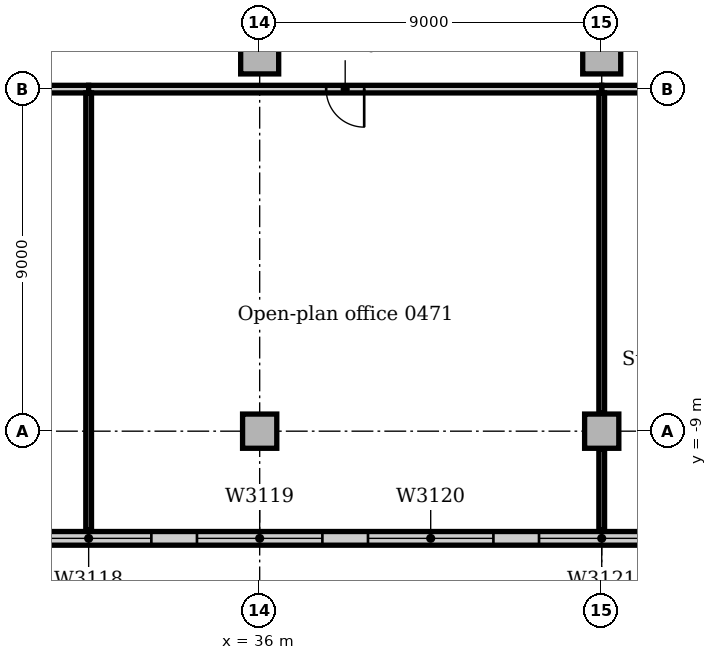
"""IFC4 building model, lengths in metres.
Left out: names, types, materials, properties, quantities, classifications, styles, units other than length and angle.
Written with IfcOpenShell. Run it as: python <this file> out.ifc"""

import sys

from ifc_helpers import new_model, si_unit, direction, frame, frame_2d, origin, origin_2d, place, context, subcontext, project, spatial, rectangle, extrude, element, fill, save


model = new_model("IFC4")
c1 = context("Model", 3, precision=1e-05, world=origin(), true_north=direction((0.0, 1.0)))
c2 = subcontext(c1, "Body", "Model", "MODEL_VIEW")
j1 = project(units=[si_unit("LENGTHUNIT", "METRE"), si_unit("PLANEANGLEUNIT", "RADIAN")], contexts=[c1])
p1 = place(None, origin())
s1 = spatial("IfcSite", under=j1, at=p1, CompositionType="ELEMENT")
p2 = place(p1, origin())
s2 = spatial("IfcBuilding", under=s1, at=p2, CompositionType="ELEMENT")
p3 = place(p2, frame((0.0, 0.0, 21.0)))
s3 = spatial("IfcBuildingStorey", under=s2, at=p3, CompositionType="ELEMENT", Elevation=21.0)
for number, where, z_axis, x_axis in (
    (1, (36.0, 0.9, 0.0), (0.0, 0.0, 1.0), (1.0, 0.0, 0.0)),
    (2, (45.0, 0.9, 0.0), (0.0, 0.0, 1.0), (1.0, 0.0, 0.0)),
):
    element("IfcColumn", number, at=place(p3, frame(where, z_axis=z_axis, x_axis=x_axis)), inside=s3, PredefinedType="COLUMN", context=c2, shape_type="SweptSolid", body=[
        extrude(rectangle(XDim=1.0, YDim=1.0, at=origin_2d()), origin(), (0.0, 0.0, 1.0), 4.85),
    ])
for number, where, z_axis, x_axis in (
    (3, (36.0, -9.0, 0.0), (0.0, 0.0, 1.0), (1.0, 0.0, 0.0)),
    (4, (45.0, -9.0, 0.0), (0.0, 0.0, 1.0), (1.0, 0.0, 0.0)),
):
    element("IfcColumn", number, at=place(p3, frame(where, z_axis=z_axis, x_axis=x_axis)), inside=s3, PredefinedType="COLUMN", context=c2, shape_type="SweptSolid", body=[
        extrude(rectangle(XDim=0.9, YDim=0.9, at=origin_2d()), origin(), (0.0, 0.0, 1.0), 4.7),
    ])
p4 = place(p3, frame((-81.0, -11.82, 0.0), z_axis=(0.0, 0.0, 1.0), x_axis=(1.0, 0.0, 0.0)))
e5 = element("IfcWall", 5, at=p4, inside=s3, PredefinedType="STANDARD", context=c2, shape_type="SweptSolid", body=[
    extrude(rectangle(XDim=144.0, YDim=0.36, at=frame_2d((72.0, 0.0))), origin(), (0.0, 0.0, 1.0), 4.85),
])
p5 = place(p4, frame((2.85, 0.0, 0.9)))
e6 = element("IfcOpeningElement", 6, at=p5, cuts=e5, PredefinedType="OPENING", context=c2, shape_type="SweptSolid", body=[
    extrude(rectangle(XDim=3.3, YDim=2.4, at=frame_2d((1.65, 1.2))), frame((0.0, 0.19, 0.0), z_axis=(0.0, -1.0, 0.0), x_axis=(1.0, 0.0, 0.0)), (0.0, 0.0, 1.0), 0.38),
])
p6 = place(p4, frame((7.35, 0.0, 0.9)))
e7 = element("IfcOpeningElement", 7, at=p6, cuts=e5, PredefinedType="OPENING", context=c2, shape_type="SweptSolid", body=[
    extrude(rectangle(XDim=3.3, YDim=2.4, at=frame_2d((1.65, 1.2))), frame((0.0, 0.19, 0.0), z_axis=(0.0, -1.0, 0.0), x_axis=(1.0, 0.0, 0.0)), (0.0, 0.0, 1.0), 0.38),
])
p7 = place(p4, frame((11.85, 0.0, 0.9)))
e8 = element("IfcOpeningElement", 8, at=p7, cuts=e5, PredefinedType="OPENING", context=c2, shape_type="SweptSolid", body=[
    extrude(rectangle(XDim=3.3, YDim=2.4, at=frame_2d((1.65, 1.2))), frame((0.0, 0.19, 0.0), z_axis=(0.0, -1.0, 0.0), x_axis=(1.0, 0.0, 0.0)), (0.0, 0.0, 1.0), 0.38),
])
p8 = place(p4, frame((16.35, 0.0, 0.9)))
e9 = element("IfcOpeningElement", 9, at=p8, cuts=e5, PredefinedType="OPENING", context=c2, shape_type="SweptSolid", body=[
    extrude(rectangle(XDim=3.3, YDim=2.4, at=frame_2d((1.65, 1.2))), frame((0.0, 0.19, 0.0), z_axis=(0.0, -1.0, 0.0), x_axis=(1.0, 0.0, 0.0)), (0.0, 0.0, 1.0), 0.38),
])
p9 = place(p4, frame((20.85, 0.0, 0.9)))
e10 = element("IfcOpeningElement", 10, at=p9, cuts=e5, PredefinedType="OPENING", context=c2, shape_type="SweptSolid", body=[
    extrude(rectangle(XDim=3.3, YDim=2.4, at=frame_2d((1.65, 1.2))), frame((0.0, 0.19, 0.0), z_axis=(0.0, -1.0, 0.0), x_axis=(1.0, 0.0, 0.0)), (0.0, 0.0, 1.0), 0.38),
])
p10 = place(p4, frame((25.35, 0.0, 0.9)))
e11 = element("IfcOpeningElement", 11, at=p10, cuts=e5, PredefinedType="OPENING", context=c2, shape_type="SweptSolid", body=[
    extrude(rectangle(XDim=3.3, YDim=2.4, at=frame_2d((1.65, 1.2))), frame((0.0, 0.19, 0.0), z_axis=(0.0, -1.0, 0.0), x_axis=(1.0, 0.0, 0.0)), (0.0, 0.0, 1.0), 0.38),
])
p11 = place(p4, frame((29.85, 0.0, 0.9)))
e12 = element("IfcOpeningElement", 12, at=p11, cuts=e5, PredefinedType="OPENING", context=c2, shape_type="SweptSolid", body=[
    extrude(rectangle(XDim=3.3, YDim=2.4, at=frame_2d((1.65, 1.2))), frame((0.0, 0.19, 0.0), z_axis=(0.0, -1.0, 0.0), x_axis=(1.0, 0.0, 0.0)), (0.0, 0.0, 1.0), 0.38),
])
p12 = place(p4, frame((34.35, 0.0, 0.9)))
e13 = element("IfcOpeningElement", 13, at=p12, cuts=e5, PredefinedType="OPENING", context=c2, shape_type="SweptSolid", body=[
    extrude(rectangle(XDim=3.3, YDim=2.4, at=frame_2d((1.65, 1.2))), frame((0.0, 0.19, 0.0), z_axis=(0.0, -1.0, 0.0), x_axis=(1.0, 0.0, 0.0)), (0.0, 0.0, 1.0), 0.38),
])
p13 = place(p4, frame((38.85, 0.0, 0.9)))
e14 = element("IfcOpeningElement", 14, at=p13, cuts=e5, PredefinedType="OPENING", context=c2, shape_type="SweptSolid", body=[
    extrude(rectangle(XDim=3.3, YDim=2.4, at=frame_2d((1.65, 1.2))), frame((0.0, 0.19, 0.0), z_axis=(0.0, -1.0, 0.0), x_axis=(1.0, 0.0, 0.0)), (0.0, 0.0, 1.0), 0.38),
])
p14 = place(p4, frame((43.35, 0.0, 0.9)))
e15 = element("IfcOpeningElement", 15, at=p14, cuts=e5, PredefinedType="OPENING", context=c2, shape_type="SweptSolid", body=[
    extrude(rectangle(XDim=3.3, YDim=2.4, at=frame_2d((1.65, 1.2))), frame((0.0, 0.19, 0.0), z_axis=(0.0, -1.0, 0.0), x_axis=(1.0, 0.0, 0.0)), (0.0, 0.0, 1.0), 0.38),
])
p15 = place(p4, frame((47.85, 0.0, 0.9)))
e16 = element("IfcOpeningElement", 16, at=p15, cuts=e5, PredefinedType="OPENING", context=c2, shape_type="SweptSolid", body=[
    extrude(rectangle(XDim=3.3, YDim=2.4, at=frame_2d((1.65, 1.2))), frame((0.0, 0.19, 0.0), z_axis=(0.0, -1.0, 0.0), x_axis=(1.0, 0.0, 0.0)), (0.0, 0.0, 1.0), 0.38),
])
p16 = place(p4, frame((52.35, 0.0, 0.9)))
e17 = element("IfcOpeningElement", 17, at=p16, cuts=e5, PredefinedType="OPENING", context=c2, shape_type="SweptSolid", body=[
    extrude(rectangle(XDim=3.3, YDim=2.4, at=frame_2d((1.65, 1.2))), frame((0.0, 0.19, 0.0), z_axis=(0.0, -1.0, 0.0), x_axis=(1.0, 0.0, 0.0)), (0.0, 0.0, 1.0), 0.38),
])
p17 = place(p4, frame((56.85, 0.0, 0.9)))
e18 = element("IfcOpeningElement", 18, at=p17, cuts=e5, PredefinedType="OPENING", context=c2, shape_type="SweptSolid", body=[
    extrude(rectangle(XDim=3.3, YDim=2.4, at=frame_2d((1.65, 1.2))), frame((0.0, 0.19, 0.0), z_axis=(0.0, -1.0, 0.0), x_axis=(1.0, 0.0, 0.0)), (0.0, 0.0, 1.0), 0.38),
])
p18 = place(p4, frame((61.35, 0.0, 0.9)))
e19 = element("IfcOpeningElement", 19, at=p18, cuts=e5, PredefinedType="OPENING", context=c2, shape_type="SweptSolid", body=[
    extrude(rectangle(XDim=3.3, YDim=2.4, at=frame_2d((1.65, 1.2))), frame((0.0, 0.19, 0.0), z_axis=(0.0, -1.0, 0.0), x_axis=(1.0, 0.0, 0.0)), (0.0, 0.0, 1.0), 0.38),
])
p19 = place(p4, frame((65.85, 0.0, 0.9)))
e20 = element("IfcOpeningElement", 20, at=p19, cuts=e5, PredefinedType="OPENING", context=c2, shape_type="SweptSolid", body=[
    extrude(rectangle(XDim=3.3, YDim=2.4, at=frame_2d((1.65, 1.2))), frame((0.0, 0.19, 0.0), z_axis=(0.0, -1.0, 0.0), x_axis=(1.0, 0.0, 0.0)), (0.0, 0.0, 1.0), 0.38),
])
p20 = place(p4, frame((70.35, 0.0, 0.9)))
e21 = element("IfcOpeningElement", 21, at=p20, cuts=e5, PredefinedType="OPENING", context=c2, shape_type="SweptSolid", body=[
    extrude(rectangle(XDim=3.3, YDim=2.4, at=frame_2d((1.65, 1.2))), frame((0.0, 0.19, 0.0), z_axis=(0.0, -1.0, 0.0), x_axis=(1.0, 0.0, 0.0)), (0.0, 0.0, 1.0), 0.38),
])
p21 = place(p4, frame((74.85, 0.0, 0.9)))
e22 = element("IfcOpeningElement", 22, at=p21, cuts=e5, PredefinedType="OPENING", context=c2, shape_type="SweptSolid", body=[
    extrude(rectangle(XDim=3.3, YDim=2.4, at=frame_2d((1.65, 1.2))), frame((0.0, 0.19, 0.0), z_axis=(0.0, -1.0, 0.0), x_axis=(1.0, 0.0, 0.0)), (0.0, 0.0, 1.0), 0.38),
])
p22 = place(p4, frame((79.35, 0.0, 0.9)))
e23 = element("IfcOpeningElement", 23, at=p22, cuts=e5, PredefinedType="OPENING", context=c2, shape_type="SweptSolid", body=[
    extrude(rectangle(XDim=3.3, YDim=2.4, at=frame_2d((1.65, 1.2))), frame((0.0, 0.19, 0.0), z_axis=(0.0, -1.0, 0.0), x_axis=(1.0, 0.0, 0.0)), (0.0, 0.0, 1.0), 0.38),
])
p23 = place(p4, frame((83.85, 0.0, 0.9)))
e24 = element("IfcOpeningElement", 24, at=p23, cuts=e5, PredefinedType="OPENING", context=c2, shape_type="SweptSolid", body=[
    extrude(rectangle(XDim=3.3, YDim=2.4, at=frame_2d((1.65, 1.2))), frame((0.0, 0.19, 0.0), z_axis=(0.0, -1.0, 0.0), x_axis=(1.0, 0.0, 0.0)), (0.0, 0.0, 1.0), 0.38),
])
p24 = place(p4, frame((88.35, 0.0, 0.9)))
e25 = element("IfcOpeningElement", 25, at=p24, cuts=e5, PredefinedType="OPENING", context=c2, shape_type="SweptSolid", body=[
    extrude(rectangle(XDim=3.3, YDim=2.4, at=frame_2d((1.65, 1.2))), frame((0.0, 0.19, 0.0), z_axis=(0.0, -1.0, 0.0), x_axis=(1.0, 0.0, 0.0)), (0.0, 0.0, 1.0), 0.38),
])
p25 = place(p4, frame((92.85, 0.0, 0.9)))
e26 = element("IfcOpeningElement", 26, at=p25, cuts=e5, PredefinedType="OPENING", context=c2, shape_type="SweptSolid", body=[
    extrude(rectangle(XDim=3.3, YDim=2.4, at=frame_2d((1.65, 1.2))), frame((0.0, 0.19, 0.0), z_axis=(0.0, -1.0, 0.0), x_axis=(1.0, 0.0, 0.0)), (0.0, 0.0, 1.0), 0.38),
])
p26 = place(p4, frame((97.35, 0.0, 0.9)))
e27 = element("IfcOpeningElement", 27, at=p26, cuts=e5, PredefinedType="OPENING", context=c2, shape_type="SweptSolid", body=[
    extrude(rectangle(XDim=3.3, YDim=2.4, at=frame_2d((1.65, 1.2))), frame((0.0, 0.19, 0.0), z_axis=(0.0, -1.0, 0.0), x_axis=(1.0, 0.0, 0.0)), (0.0, 0.0, 1.0), 0.38),
])
p27 = place(p4, frame((101.85, 0.0, 0.9)))
e28 = element("IfcOpeningElement", 28, at=p27, cuts=e5, PredefinedType="OPENING", context=c2, shape_type="SweptSolid", body=[
    extrude(rectangle(XDim=3.3, YDim=2.4, at=frame_2d((1.65, 1.2))), frame((0.0, 0.19, 0.0), z_axis=(0.0, -1.0, 0.0), x_axis=(1.0, 0.0, 0.0)), (0.0, 0.0, 1.0), 0.38),
])
p28 = place(p4, frame((106.35, 0.0, 0.9)))
e29 = element("IfcOpeningElement", 29, at=p28, cuts=e5, PredefinedType="OPENING", context=c2, shape_type="SweptSolid", body=[
    extrude(rectangle(XDim=3.3, YDim=2.4, at=frame_2d((1.65, 1.2))), frame((0.0, 0.19, 0.0), z_axis=(0.0, -1.0, 0.0), x_axis=(1.0, 0.0, 0.0)), (0.0, 0.0, 1.0), 0.38),
])
p29 = place(p4, frame((110.85, 0.0, 0.9)))
e30 = element("IfcOpeningElement", 30, at=p29, cuts=e5, PredefinedType="OPENING", context=c2, shape_type="SweptSolid", body=[
    extrude(rectangle(XDim=3.3, YDim=2.4, at=frame_2d((1.65, 1.2))), frame((0.0, 0.19, 0.0), z_axis=(0.0, -1.0, 0.0), x_axis=(1.0, 0.0, 0.0)), (0.0, 0.0, 1.0), 0.38),
])
p30 = place(p4, frame((115.35, 0.0, 0.9)))
e31 = element("IfcOpeningElement", 31, at=p30, cuts=e5, PredefinedType="OPENING", context=c2, shape_type="SweptSolid", body=[
    extrude(rectangle(XDim=3.3, YDim=2.4, at=frame_2d((1.65, 1.2))), frame((0.0, 0.19, 0.0), z_axis=(0.0, -1.0, 0.0), x_axis=(1.0, 0.0, 0.0)), (0.0, 0.0, 1.0), 0.38),
])
p31 = place(p4, frame((119.85, 0.0, 0.9)))
e32 = element("IfcOpeningElement", 32, at=p31, cuts=e5, PredefinedType="OPENING", context=c2, shape_type="SweptSolid", body=[
    extrude(rectangle(XDim=3.3, YDim=2.4, at=frame_2d((1.65, 1.2))), frame((0.0, 0.19, 0.0), z_axis=(0.0, -1.0, 0.0), x_axis=(1.0, 0.0, 0.0)), (0.0, 0.0, 1.0), 0.38),
])
p32 = place(p4, frame((124.35, 0.0, 0.9)))
e33 = element("IfcOpeningElement", 33, at=p32, cuts=e5, PredefinedType="OPENING", context=c2, shape_type="SweptSolid", body=[
    extrude(rectangle(XDim=3.3, YDim=2.4, at=frame_2d((1.65, 1.2))), frame((0.0, 0.19, 0.0), z_axis=(0.0, -1.0, 0.0), x_axis=(1.0, 0.0, 0.0)), (0.0, 0.0, 1.0), 0.38),
])
p33 = place(p4, frame((128.85, 0.0, 0.9)))
e34 = element("IfcOpeningElement", 34, at=p33, cuts=e5, PredefinedType="OPENING", context=c2, shape_type="SweptSolid", body=[
    extrude(rectangle(XDim=3.3, YDim=2.4, at=frame_2d((1.65, 1.2))), frame((0.0, 0.19, 0.0), z_axis=(0.0, -1.0, 0.0), x_axis=(1.0, 0.0, 0.0)), (0.0, 0.0, 1.0), 0.38),
])
p34 = place(p4, frame((133.35, 0.0, 0.9)))
e35 = element("IfcOpeningElement", 35, at=p34, cuts=e5, PredefinedType="OPENING", context=c2, shape_type="SweptSolid", body=[
    extrude(rectangle(XDim=3.3, YDim=2.4, at=frame_2d((1.65, 1.2))), frame((0.0, 0.19, 0.0), z_axis=(0.0, -1.0, 0.0), x_axis=(1.0, 0.0, 0.0)), (0.0, 0.0, 1.0), 0.38),
])
p35 = place(p4, frame((137.85, 0.0, 0.9)))
e36 = element("IfcOpeningElement", 36, at=p35, cuts=e5, PredefinedType="OPENING", context=c2, shape_type="SweptSolid", body=[
    extrude(rectangle(XDim=3.3, YDim=2.4, at=frame_2d((1.65, 1.2))), frame((0.0, 0.19, 0.0), z_axis=(0.0, -1.0, 0.0), x_axis=(1.0, 0.0, 0.0)), (0.0, 0.0, 1.0), 0.38),
])
p36 = place(p3, frame((45.0, 0.0, 0.0), z_axis=(0.0, 0.0, 1.0), x_axis=(1.0, 0.0, 0.0)))
e37 = element("IfcWall", 37, at=p36, inside=s3, PredefinedType="PARTITIONING", context=c2, shape_type="SweptSolid", body=[
    extrude(rectangle(XDim=9.0, YDim=0.2, at=frame_2d((4.5, 0.0))), origin(), (0.0, 0.0, 1.0), 4.7),
])
p37 = place(p36, frame((4.6, 0.0, 0.0)))
e38 = element("IfcOpeningElement", 38, at=p37, cuts=e37, PredefinedType="OPENING", context=c2, shape_type="SweptSolid", body=[
    extrude(rectangle(XDim=1.0, YDim=2.1, at=frame_2d((0.5, 1.05))), frame((0.0, 0.11, 0.0), z_axis=(0.0, -1.0, 0.0), x_axis=(1.0, 0.0, 0.0)), (0.0, 0.0, 1.0), 0.22),
])
p38 = place(p3, frame((18.0, 0.0, 0.0), z_axis=(0.0, 0.0, 1.0), x_axis=(1.0, 0.0, 0.0)))
e39 = element("IfcWall", 39, at=p38, inside=s3, PredefinedType="PARTITIONING", context=c2, shape_type="SweptSolid", body=[
    extrude(rectangle(XDim=13.5, YDim=0.2, at=frame_2d((6.75, 0.0))), origin(), (0.0, 0.0, 1.0), 4.85),
])
p39 = place(p38, frame((6.25, 0.0, 0.0)))
e40 = element("IfcOpeningElement", 40, at=p39, cuts=e39, PredefinedType="OPENING", context=c2, shape_type="SweptSolid", body=[
    extrude(rectangle(XDim=1.0, YDim=2.1, at=frame_2d((0.5, 1.05))), frame((0.0, 0.11, 0.0), z_axis=(0.0, -1.0, 0.0), x_axis=(1.0, 0.0, 0.0)), (0.0, 0.0, 1.0), 0.22),
])
p40 = place(p3, frame((31.5, 0.0, 0.0), z_axis=(0.0, 0.0, 1.0), x_axis=(1.0, 0.0, 0.0)))
e41 = element("IfcWall", 41, at=p40, inside=s3, PredefinedType="PARTITIONING", context=c2, shape_type="SweptSolid", body=[
    extrude(rectangle(XDim=13.5, YDim=0.2, at=frame_2d((6.75, 0.0))), origin(), (0.0, 0.0, 1.0), 4.85),
])
p41 = place(p40, frame((6.25, 0.0, 0.0)))
e42 = element("IfcOpeningElement", 42, at=p41, cuts=e41, PredefinedType="OPENING", context=c2, shape_type="SweptSolid", body=[
    extrude(rectangle(XDim=1.0, YDim=2.1, at=frame_2d((0.5, 1.05))), frame((0.0, 0.11, 0.0), z_axis=(0.0, -1.0, 0.0), x_axis=(1.0, 0.0, 0.0)), (0.0, 0.0, 1.0), 0.22),
])
p42 = place(p3, frame((45.0, -11.6, 0.0), z_axis=(0.0, 0.0, 1.0), x_axis=(0.0, 1.0, 0.0)))
e43 = element("IfcWall", 43, at=p42, inside=s3, PredefinedType="PARTITIONING", context=c2, shape_type="SweptSolid", body=[
    extrude(rectangle(XDim=2.13, YDim=0.15, at=frame_2d((1.065, 0.0))), origin(), (0.0, 0.0, 1.0), 4.7),
])
p43 = place(p3, frame((45.0, -8.53, 0.0), z_axis=(0.0, 0.0, 1.0), x_axis=(0.0, 1.0, 0.0)))
e44 = element("IfcWall", 44, at=p43, inside=s3, PredefinedType="PARTITIONING", context=c2, shape_type="SweptSolid", body=[
    extrude(rectangle(XDim=8.43, YDim=0.15, at=frame_2d((4.215, 0.0))), origin(), (0.0, 0.0, 1.0), 4.7),
])
p44 = place(p3, frame((31.5, -11.6, 0.0), z_axis=(0.0, 0.0, 1.0), x_axis=(0.0, 1.0, 0.0)))
e45 = element("IfcWall", 45, at=p44, inside=s3, PredefinedType="PARTITIONING", context=c2, shape_type="SweptSolid", body=[
    extrude(rectangle(XDim=11.5, YDim=0.15, at=frame_2d((5.75, 0.0))), origin(), (0.0, 0.0, 1.0), 4.7),
])
p45 = place(p29, origin())
e46 = element("IfcWindow", 46, at=p45, inside=s3, PartitioningType="SINGLE_PANEL", PredefinedType="WINDOW", context=c2, shape_type="SweptSolid", body=[
    extrude(rectangle(XDim=3.3, YDim=2.4, at=frame_2d((1.65, 1.2))), frame((0.0, 0.13, 0.0), z_axis=(0.0, -1.0, 0.0), x_axis=(1.0, 0.0, 0.0)), (0.0, 0.0, 1.0), 0.06),
])
fill(e30, e46)
p46 = place(p30, origin())
e47 = element("IfcWindow", 47, at=p46, inside=s3, PartitioningType="SINGLE_PANEL", PredefinedType="WINDOW", context=c2, shape_type="SweptSolid", body=[
    extrude(rectangle(XDim=3.3, YDim=2.4, at=frame_2d((1.65, 1.2))), frame((0.0, 0.13, 0.0), z_axis=(0.0, -1.0, 0.0), x_axis=(1.0, 0.0, 0.0)), (0.0, 0.0, 1.0), 0.06),
])
fill(e31, e47)
p47 = place(p31, origin())
e48 = element("IfcWindow", 48, at=p47, inside=s3, PartitioningType="SINGLE_PANEL", PredefinedType="WINDOW", context=c2, shape_type="SweptSolid", body=[
    extrude(rectangle(XDim=3.3, YDim=2.4, at=frame_2d((1.65, 1.2))), frame((0.0, 0.13, 0.0), z_axis=(0.0, -1.0, 0.0), x_axis=(1.0, 0.0, 0.0)), (0.0, 0.0, 1.0), 0.06),
])
fill(e32, e48)
p48 = place(p32, origin())
e49 = element("IfcWindow", 49, at=p48, inside=s3, PartitioningType="SINGLE_PANEL", PredefinedType="WINDOW", context=c2, shape_type="SweptSolid", body=[
    extrude(rectangle(XDim=3.3, YDim=2.4, at=frame_2d((1.65, 1.2))), frame((0.0, 0.13, 0.0), z_axis=(0.0, -1.0, 0.0), x_axis=(1.0, 0.0, 0.0)), (0.0, 0.0, 1.0), 0.06),
])
fill(e33, e49)
p49 = place(p41, frame((1.0, 0.0, 0.0), z_axis=(0.0, 0.0, 1.0), x_axis=(-1.0, 0.0, 0.0)))
e50 = element("IfcDoor", 50, at=p49, inside=s3, OperationType="SINGLE_SWING_LEFT", PredefinedType="DOOR", context=c2, shape_type="SweptSolid", body=[
    extrude(rectangle(XDim=1.0, YDim=2.1, at=frame_2d((0.5, 1.05))), frame((0.0, 0.025, 0.0), z_axis=(0.0, -1.0, 0.0), x_axis=(1.0, 0.0, 0.0)), (0.0, 0.0, 1.0), 0.05),
])
fill(e42, e50)
save(model, sys.argv[1])
